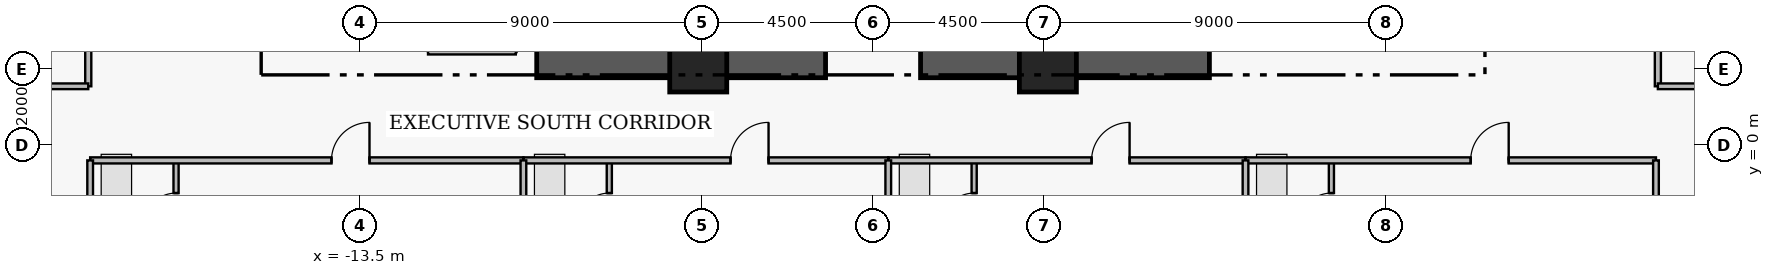
"""IFC4 building model, lengths in metres.
Left out: names, types, materials, properties, quantities, classifications, styles, units other than length and angle.
Written with IfcOpenShell. Run it as: python <this file> out.ifc"""

import sys

from ifc_helpers import new_model, si_unit, direction, frame, frame_2d, origin, origin_2d, place, context, subcontext, project, spatial, rectangle, extrude, element, fill, save


model = new_model("IFC4")
c1 = context("Model", 3, precision=1e-05, world=origin(), true_north=direction((0.0, 1.0)))
c2 = subcontext(c1, "Body", "Model", "MODEL_VIEW")
j1 = project(units=[si_unit("LENGTHUNIT", "METRE"), si_unit("PLANEANGLEUNIT", "RADIAN")], contexts=[c1])
p1 = place(None, origin())
s1 = spatial("IfcSite", under=j1, at=p1, CompositionType="ELEMENT")
p2 = place(p1, origin())
s2 = spatial("IfcBuilding", under=s1, at=p2, CompositionType="ELEMENT")
p3 = place(p2, frame((0.0, 0.0, 121.2)))
s3 = spatial("IfcBuildingStorey", under=s2, at=p3, CompositionType="ELEMENT", Elevation=121.2)
for number, where, z_axis, x_axis in (
    (1, (-8.85, 2.15, 0.0), (0.0, 0.0, 1.0), (1.0, 0.0, 0.0)),
    (2, (1.25, 2.15, 0.0), (0.0, 0.0, 1.0), (1.0, 0.0, 0.0)),
):
    element("IfcWall", number, at=place(p3, frame(where, z_axis=z_axis, x_axis=x_axis)), inside=s3, PredefinedType="SHEAR", context=c2, shape_type="SweptSolid", body=[
        extrude(rectangle(XDim=7.6, YDim=0.75, at=frame_2d((3.8, 0.0))), origin(), (0.0, 0.0, 1.0), 3.43),
    ])
for number, where, z_axis, x_axis in (
    (3, (-4.6, 2.15, 0.0), (0.0, 0.0, 1.0), (1.0, 0.0, 0.0)),
    (4, (4.6, 2.15, 0.0), (0.0, 0.0, 1.0), (1.0, 0.0, 0.0)),
):
    element("IfcColumn", number, at=place(p3, frame(where, z_axis=z_axis, x_axis=x_axis)), inside=s3, PredefinedType="COLUMN", context=c2, shape_type="SweptSolid", body=[
        extrude(rectangle(XDim=1.5, YDim=1.5, at=origin_2d()), origin(), (0.0, 0.0, 1.0), 3.65),
    ])
p4 = place(p3, frame((-18.34, -2.76, 0.0), z_axis=(0.0, 0.0, 1.0), x_axis=(0.0, 1.0, 0.0)))
e5 = element("IfcWall", 5, at=p4, inside=s3, PredefinedType="PLUMBINGWALL", context=c2, shape_type="SweptSolid", body=[
    extrude(rectangle(XDim=2.36, YDim=0.135, at=frame_2d((1.18, 0.0))), origin(), (0.0, 0.0, 1.0), 3.43),
])
p5 = place(p4, frame((0.65, 0.0, 0.0)))
e6 = element("IfcOpeningElement", 6, at=p5, cuts=e5, PredefinedType="OPENING", context=c2, shape_type="SweptSolid", body=[
    extrude(rectangle(XDim=0.85, YDim=2.1, at=frame_2d((0.425, 1.05))), frame((0.0, 0.077, 0.0), z_axis=(0.0, -1.0, 0.0), x_axis=(1.0, 0.0, 0.0)), (0.0, 0.0, 1.0), 0.155),
])
p6 = place(p3, frame((-20.6, -0.4, 0.0), z_axis=(0.0, 0.0, 1.0), x_axis=(1.0, 0.0, 0.0)))
e7 = element("IfcWall", 7, at=p6, inside=s3, PredefinedType="PARTITIONING", context=c2, shape_type="SweptSolid", body=[
    extrude(rectangle(XDim=11.4, YDim=0.16, at=frame_2d((5.7, 0.0))), origin(), (0.0, 0.0, 1.0), 3.43),
])
p7 = place(p6, frame((6.35, 0.0, 0.0)))
e8 = element("IfcOpeningElement", 8, at=p7, cuts=e7, PredefinedType="OPENING", context=c2, shape_type="SweptSolid", body=[
    extrude(rectangle(XDim=1.0, YDim=2.15, at=frame_2d((0.5, 1.075))), frame((0.0, 0.09, 0.0), z_axis=(0.0, -1.0, 0.0), x_axis=(1.0, 0.0, 0.0)), (0.0, 0.0, 1.0), 0.18),
])
p8 = place(p3, frame((-6.94, -2.76, 0.0), z_axis=(0.0, 0.0, 1.0), x_axis=(0.0, 1.0, 0.0)))
e9 = element("IfcWall", 9, at=p8, inside=s3, PredefinedType="PLUMBINGWALL", context=c2, shape_type="SweptSolid", body=[
    extrude(rectangle(XDim=2.36, YDim=0.135, at=frame_2d((1.18, 0.0))), origin(), (0.0, 0.0, 1.0), 3.43),
])
p9 = place(p8, frame((0.65, 0.0, 0.0)))
e10 = element("IfcOpeningElement", 10, at=p9, cuts=e9, PredefinedType="OPENING", context=c2, shape_type="SweptSolid", body=[
    extrude(rectangle(XDim=0.85, YDim=2.1, at=frame_2d((0.425, 1.05))), frame((0.0, 0.077, 0.0), z_axis=(0.0, -1.0, 0.0), x_axis=(1.0, 0.0, 0.0)), (0.0, 0.0, 1.0), 0.155),
])
p10 = place(p3, frame((-9.2, -0.4, 0.0), z_axis=(0.0, 0.0, 1.0), x_axis=(1.0, 0.0, 0.0)))
e11 = element("IfcWall", 11, at=p10, inside=s3, PredefinedType="PARTITIONING", context=c2, shape_type="SweptSolid", body=[
    extrude(rectangle(XDim=9.6, YDim=0.16, at=frame_2d((4.8, 0.0))), origin(), (0.0, 0.0, 1.0), 3.43),
])
p11 = place(p10, frame((5.45, 0.0, 0.0)))
e12 = element("IfcOpeningElement", 12, at=p11, cuts=e11, PredefinedType="OPENING", context=c2, shape_type="SweptSolid", body=[
    extrude(rectangle(XDim=1.0, YDim=2.15, at=frame_2d((0.5, 1.075))), frame((0.0, 0.09, 0.0), z_axis=(0.0, -1.0, 0.0), x_axis=(1.0, 0.0, 0.0)), (0.0, 0.0, 1.0), 0.18),
])
p12 = place(p3, frame((2.66, -2.76, 0.0), z_axis=(0.0, 0.0, 1.0), x_axis=(0.0, 1.0, 0.0)))
e13 = element("IfcWall", 13, at=p12, inside=s3, PredefinedType="PLUMBINGWALL", context=c2, shape_type="SweptSolid", body=[
    extrude(rectangle(XDim=2.36, YDim=0.135, at=frame_2d((1.18, 0.0))), origin(), (0.0, 0.0, 1.0), 3.43),
])
p13 = place(p12, frame((0.65, 0.0, 0.0)))
e14 = element("IfcOpeningElement", 14, at=p13, cuts=e13, PredefinedType="OPENING", context=c2, shape_type="SweptSolid", body=[
    extrude(rectangle(XDim=0.85, YDim=2.1, at=frame_2d((0.425, 1.05))), frame((0.0, 0.077, 0.0), z_axis=(0.0, -1.0, 0.0), x_axis=(1.0, 0.0, 0.0)), (0.0, 0.0, 1.0), 0.155),
])
p14 = place(p3, frame((0.4, -0.4, 0.0), z_axis=(0.0, 0.0, 1.0), x_axis=(1.0, 0.0, 0.0)))
e15 = element("IfcWall", 15, at=p14, inside=s3, PredefinedType="PARTITIONING", context=c2, shape_type="SweptSolid", body=[
    extrude(rectangle(XDim=9.4, YDim=0.16, at=frame_2d((4.7, 0.0))), origin(), (0.0, 0.0, 1.0), 3.43),
])
p15 = place(p14, frame((5.35, 0.0, 0.0)))
e16 = element("IfcOpeningElement", 16, at=p15, cuts=e15, PredefinedType="OPENING", context=c2, shape_type="SweptSolid", body=[
    extrude(rectangle(XDim=1.0, YDim=2.15, at=frame_2d((0.5, 1.075))), frame((0.0, 0.09, 0.0), z_axis=(0.0, -1.0, 0.0), x_axis=(1.0, 0.0, 0.0)), (0.0, 0.0, 1.0), 0.18),
])
p16 = place(p3, frame((12.06, -2.76, 0.0), z_axis=(0.0, 0.0, 1.0), x_axis=(0.0, 1.0, 0.0)))
e17 = element("IfcWall", 17, at=p16, inside=s3, PredefinedType="PLUMBINGWALL", context=c2, shape_type="SweptSolid", body=[
    extrude(rectangle(XDim=2.36, YDim=0.135, at=frame_2d((1.18, 0.0))), origin(), (0.0, 0.0, 1.0), 3.43),
])
p17 = place(p16, frame((0.65, 0.0, 0.0)))
e18 = element("IfcOpeningElement", 18, at=p17, cuts=e17, PredefinedType="OPENING", context=c2, shape_type="SweptSolid", body=[
    extrude(rectangle(XDim=0.85, YDim=2.1, at=frame_2d((0.425, 1.05))), frame((0.0, 0.077, 0.0), z_axis=(0.0, -1.0, 0.0), x_axis=(1.0, 0.0, 0.0)), (0.0, 0.0, 1.0), 0.155),
])
p18 = place(p3, frame((9.8, -0.4, 0.0), z_axis=(0.0, 0.0, 1.0), x_axis=(1.0, 0.0, 0.0)))
e19 = element("IfcWall", 19, at=p18, inside=s3, PredefinedType="PARTITIONING", context=c2, shape_type="SweptSolid", body=[
    extrude(rectangle(XDim=10.8, YDim=0.16, at=frame_2d((5.4, 0.0))), origin(), (0.0, 0.0, 1.0), 3.43),
])
p19 = place(p18, frame((5.925, 0.0, 0.0)))
e20 = element("IfcOpeningElement", 20, at=p19, cuts=e19, PredefinedType="OPENING", context=c2, shape_type="SweptSolid", body=[
    extrude(rectangle(XDim=1.0, YDim=2.15, at=frame_2d((0.5, 1.075))), frame((0.0, 0.09, 0.0), z_axis=(0.0, -1.0, 0.0), x_axis=(1.0, 0.0, 0.0)), (0.0, 0.0, 1.0), 0.18),
])
p20 = place(p3, frame((20.65, 1.55, 0.0), z_axis=(0.0, 0.0, 1.0), x_axis=(0.0, 1.0, 0.0)))
e21 = element("IfcWall", 21, at=p20, inside=s3, PredefinedType="PARTITIONING", context=c2, shape_type="SweptSolid", body=[
    extrude(rectangle(XDim=5.2, YDim=0.16, at=frame_2d((2.6, 0.0))), origin(), (0.0, 0.0, 1.0), 3.43),
])
p21 = place(p20, frame((2.14, 0.0, 0.0)))
e22 = element("IfcOpeningElement", 22, at=p21, cuts=e21, PredefinedType="OPENING", context=c2, shape_type="SweptSolid", body=[
    extrude(rectangle(XDim=0.92, YDim=2.12, at=frame_2d((0.46, 1.06))), frame((0.0, 0.09, 0.0), z_axis=(0.0, -1.0, 0.0), x_axis=(1.0, 0.0, 0.0)), (0.0, 0.0, 1.0), 0.18),
])
p22 = place(p3, frame((-20.65, 1.55, 0.0), z_axis=(0.0, 0.0, 1.0), x_axis=(0.0, 1.0, 0.0)))
e23 = element("IfcWall", 23, at=p22, inside=s3, PredefinedType="PARTITIONING", context=c2, shape_type="SweptSolid", body=[
    extrude(rectangle(XDim=13.3, YDim=0.16, at=frame_2d((6.65, 0.0))), origin(), (0.0, 0.0, 1.0), 3.43),
])
p23 = place(p22, frame((6.175, 0.0, 0.0)))
e24 = element("IfcOpeningElement", 24, at=p23, cuts=e23, PredefinedType="OPENING", context=c2, shape_type="SweptSolid", body=[
    extrude(rectangle(XDim=0.95, YDim=2.15, at=frame_2d((0.475, 1.075))), frame((0.0, 0.09, 0.0), z_axis=(0.0, -1.0, 0.0), x_axis=(1.0, 0.0, 0.0)), (0.0, 0.0, 1.0), 0.18),
])
p24 = place(p3, frame((-11.71, 2.47, 0.0), z_axis=(0.0, 0.0, 1.0), x_axis=(1.0, 0.0, 0.0)))
e25 = element("IfcWall", 25, at=p24, inside=s3, PredefinedType="PARTITIONING", context=c2, shape_type="SweptSolid", body=[
    extrude(rectangle(XDim=2.31, YDim=0.165, at=frame_2d((1.155, 0.0))), origin(), (0.0, 0.0, 1.0), 2.03),
])
p25 = place(p3, frame((-20.6, -11.9, 0.0), z_axis=(0.0, 0.0, 1.0), x_axis=(0.0, 1.0, 0.0)))
e26 = element("IfcWall", 26, at=p25, inside=s3, PredefinedType="PARTITIONING", context=c2, shape_type="SweptSolid", body=[
    extrude(rectangle(XDim=11.5, YDim=0.15, at=frame_2d((5.75, 0.0))), origin(), (0.0, 0.0, 1.0), 3.43),
])
for number, where, z_axis, x_axis in (
    (27, (-9.2, -15.32, 0.0), (0.0, 0.0, 1.0), (0.0, 1.0, 0.0)),
    (28, (0.4, -15.32, 0.0), (0.0, 0.0, 1.0), (0.0, 1.0, 0.0)),
    (29, (9.8, -15.32, 0.0), (0.0, 0.0, 1.0), (0.0, 1.0, 0.0)),
):
    element("IfcWall", number, at=place(p3, frame(where, z_axis=z_axis, x_axis=x_axis)), inside=s3, PredefinedType="PARTITIONING", context=c2, shape_type="SweptSolid", body=[
        extrude(rectangle(XDim=14.92, YDim=0.15, at=frame_2d((7.46, 0.0))), origin(), (0.0, 0.0, 1.0), 3.43),
    ])
p26 = place(p3, frame((20.6, -11.9, 0.0), z_axis=(0.0, 0.0, 1.0), x_axis=(0.0, 1.0, 0.0)))
e30 = element("IfcWall", 30, at=p26, inside=s3, PredefinedType="PARTITIONING", context=c2, shape_type="SweptSolid", body=[
    extrude(rectangle(XDim=11.5, YDim=0.15, at=frame_2d((5.75, 0.0))), origin(), (0.0, 0.0, 1.0), 3.43),
])
for number, where, z_axis, x_axis in (
    (31, (20.65, 1.55, 0.0), (0.0, 0.0, 1.0), (1.0, 0.0, 0.0)),
    (32, (-23.867, 1.55, 0.0), (0.0, 0.0, 1.0), (1.0, 0.0, 0.0)),
):
    element("IfcWall", number, at=place(p3, frame(where, z_axis=z_axis, x_axis=x_axis)), inside=s3, PredefinedType="PARTITIONING", context=c2, shape_type="SweptSolid", body=[
        extrude(rectangle(XDim=3.217, YDim=0.15, at=frame_2d((1.608, 0.0))), origin(), (0.0, 0.0, 1.0), 3.43),
    ])
p27 = place(p5, origin())
e33 = element("IfcDoor", 33, at=p27, inside=s3, OperationType="SINGLE_SWING_LEFT", PredefinedType="DOOR", context=c2, shape_type="SweptSolid", body=[
    extrude(rectangle(XDim=0.85, YDim=2.1, at=frame_2d((0.425, 1.05))), frame((0.0, 0.025, 0.0), z_axis=(0.0, -1.0, 0.0), x_axis=(1.0, 0.0, 0.0)), (0.0, 0.0, 1.0), 0.05),
])
fill(e6, e33)
p28 = place(p7, origin())
e34 = element("IfcDoor", 34, at=p28, inside=s3, OperationType="SINGLE_SWING_RIGHT", PredefinedType="DOOR", context=c2, shape_type="SweptSolid", body=[
    extrude(rectangle(XDim=1.0, YDim=2.15, at=frame_2d((0.5, 1.075))), frame((0.0, 0.025, 0.0), z_axis=(0.0, -1.0, 0.0), x_axis=(1.0, 0.0, 0.0)), (0.0, 0.0, 1.0), 0.05),
])
fill(e8, e34)
p29 = place(p9, origin())
e35 = element("IfcDoor", 35, at=p29, inside=s3, OperationType="SINGLE_SWING_LEFT", PredefinedType="DOOR", context=c2, shape_type="SweptSolid", body=[
    extrude(rectangle(XDim=0.85, YDim=2.1, at=frame_2d((0.425, 1.05))), frame((0.0, 0.025, 0.0), z_axis=(0.0, -1.0, 0.0), x_axis=(1.0, 0.0, 0.0)), (0.0, 0.0, 1.0), 0.05),
])
fill(e10, e35)
p30 = place(p11, origin())
e36 = element("IfcDoor", 36, at=p30, inside=s3, OperationType="SINGLE_SWING_RIGHT", PredefinedType="DOOR", context=c2, shape_type="SweptSolid", body=[
    extrude(rectangle(XDim=1.0, YDim=2.15, at=frame_2d((0.5, 1.075))), frame((0.0, 0.025, 0.0), z_axis=(0.0, -1.0, 0.0), x_axis=(1.0, 0.0, 0.0)), (0.0, 0.0, 1.0), 0.05),
])
fill(e12, e36)
p31 = place(p13, origin())
e37 = element("IfcDoor", 37, at=p31, inside=s3, OperationType="SINGLE_SWING_LEFT", PredefinedType="DOOR", context=c2, shape_type="SweptSolid", body=[
    extrude(rectangle(XDim=0.85, YDim=2.1, at=frame_2d((0.425, 1.05))), frame((0.0, 0.025, 0.0), z_axis=(0.0, -1.0, 0.0), x_axis=(1.0, 0.0, 0.0)), (0.0, 0.0, 1.0), 0.05),
])
fill(e14, e37)
p32 = place(p15, origin())
e38 = element("IfcDoor", 38, at=p32, inside=s3, OperationType="SINGLE_SWING_RIGHT", PredefinedType="DOOR", context=c2, shape_type="SweptSolid", body=[
    extrude(rectangle(XDim=1.0, YDim=2.15, at=frame_2d((0.5, 1.075))), frame((0.0, 0.025, 0.0), z_axis=(0.0, -1.0, 0.0), x_axis=(1.0, 0.0, 0.0)), (0.0, 0.0, 1.0), 0.05),
])
fill(e16, e38)
p33 = place(p17, origin())
e39 = element("IfcDoor", 39, at=p33, inside=s3, OperationType="SINGLE_SWING_LEFT", PredefinedType="DOOR", context=c2, shape_type="SweptSolid", body=[
    extrude(rectangle(XDim=0.85, YDim=2.1, at=frame_2d((0.425, 1.05))), frame((0.0, 0.025, 0.0), z_axis=(0.0, -1.0, 0.0), x_axis=(1.0, 0.0, 0.0)), (0.0, 0.0, 1.0), 0.05),
])
fill(e18, e39)
p34 = place(p19, origin())
e40 = element("IfcDoor", 40, at=p34, inside=s3, OperationType="SINGLE_SWING_RIGHT", PredefinedType="DOOR", context=c2, shape_type="SweptSolid", body=[
    extrude(rectangle(XDim=1.0, YDim=2.15, at=frame_2d((0.5, 1.075))), frame((0.0, 0.025, 0.0), z_axis=(0.0, -1.0, 0.0), x_axis=(1.0, 0.0, 0.0)), (0.0, 0.0, 1.0), 0.05),
])
fill(e20, e40)
save(model, sys.argv[1])
